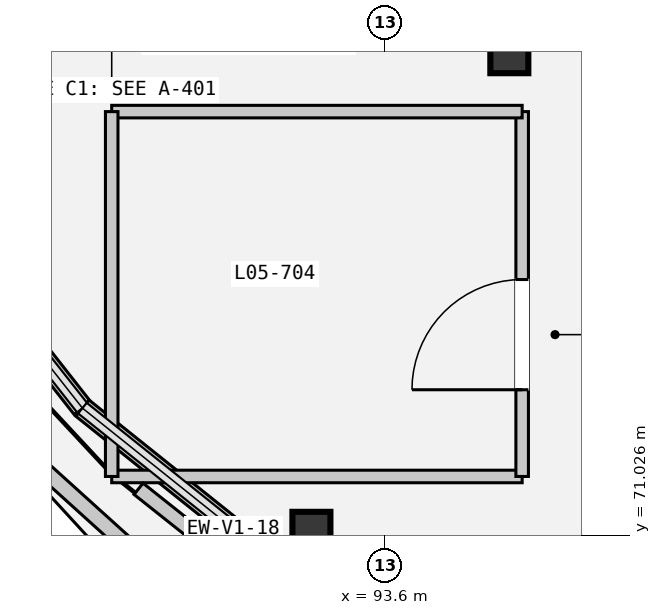
"""IFC4 building model, lengths in metres.
Left out: names, types, materials, properties, quantities, classifications, styles, units other than length and angle.
Written with IfcOpenShell. Run it as: python <this file> out.ifc"""

import sys

from ifc_helpers import new_model, si_unit, direction, frame, frame_2d, origin, origin_2d, place, context, subcontext, project, spatial, rectangle, extrude, element, fill, save


model = new_model("IFC4")
c1 = context("Model", 3, precision=1e-05, world=origin(), true_north=direction((0.0, 1.0)))
c2 = subcontext(c1, "Body", "Model", "MODEL_VIEW")
j1 = project(units=[si_unit("LENGTHUNIT", "METRE"), si_unit("PLANEANGLEUNIT", "RADIAN")], contexts=[c1])
p1 = place(None, origin())
s1 = spatial("IfcSite", under=j1, at=p1, CompositionType="ELEMENT")
p2 = place(p1, origin())
s2 = spatial("IfcBuilding", under=s1, at=p2, CompositionType="ELEMENT")
p3 = place(p2, frame((0.0, 0.0, 24.3)))
s3 = spatial("IfcBuildingStorey", under=s2, at=p3, CompositionType="ELEMENT", Elevation=24.3)
for number, where, z_axis, x_axis in (
    (1, (92.627, 71.085, 0.0), (0.0, 0.0, 1.0), (1.0, 0.0, 0.0)),
    (2, (95.231, 77.355, 0.0), (0.0, 0.0, 1.0), (1.0, 0.0, 0.0)),
):
    element("IfcColumn", number, at=place(p3, frame(where, z_axis=z_axis, x_axis=x_axis)), inside=s3, PredefinedType="COLUMN", context=c2, shape_type="SweptSolid", body=[
        extrude(rectangle(XDim=0.5, YDim=0.5, at=origin_2d()), origin(), (0.0, 0.0, 1.0), 4.5),
    ])
p4 = place(p3, frame((86.631, 76.5, 0.0), z_axis=(0.0, 0.0, 1.0), x_axis=(0.617498011037, -0.786572441906, 0.0)))
e3 = element("IfcWall", 3, at=p4, inside=s3, PredefinedType="SOLIDWALL", context=c2, shape_type="SweptSolid", body=[
    extrude(rectangle(XDim=4.833, YDim=0.275, at=frame_2d((2.417, 0.0))), origin(), (0.0, 0.0, 1.0), 1.02),
])
p5 = place(p3, frame((89.615, 72.699, 0.0), z_axis=(0.0, 0.0, 1.0), x_axis=(0.780742210705, -0.624853263113, 0.0)))
e4 = element("IfcWall", 4, at=p5, inside=s3, PredefinedType="SOLIDWALL", context=c2, shape_type="SweptSolid", body=[
    extrude(rectangle(XDim=5.081, YDim=0.275, at=frame_2d((2.54, 0.0))), origin(), (0.0, 0.0, 1.0), 1.02),
])
p6 = place(p3, frame((88.711, 72.245, 0.0), z_axis=(0.0, 0.0, 1.0), x_axis=(0.741736484104, -0.670691425433, 0.0)))
e5 = element("IfcWall", 5, at=p6, inside=s3, PredefinedType="PARAPET", context=c2, shape_type="SweptSolid", body=[
    extrude(rectangle(XDim=4.869, YDim=0.205, at=frame_2d((2.435, 0.0))), origin(), (0.0, 0.0, 1.0), 0.92),
])
p7 = place(p3, frame((90.0, 71.8, 0.0), z_axis=(0.0, 0.0, 1.0), x_axis=(1.0, 0.0, 0.0)))
e6 = element("IfcWall", 6, at=p7, inside=s3, PredefinedType="PARTITIONING", context=c2, shape_type="SweptSolid", body=[
    extrude(rectangle(XDim=5.4, YDim=0.165, at=frame_2d((2.7, 0.0))), origin(), (0.0, 0.0, 1.0), 3.45),
])
p8 = place(p3, frame((95.4, 71.8, 0.0), z_axis=(0.0, 0.0, 1.0), x_axis=(0.0, 1.0, 0.0)))
e7 = element("IfcWall", 7, at=p8, inside=s3, PredefinedType="PARTITIONING", context=c2, shape_type="SweptSolid", body=[
    extrude(rectangle(XDim=4.8, YDim=0.165, at=frame_2d((2.4, 0.0))), origin(), (0.0, 0.0, 1.0), 3.45),
])
p9 = place(p8, frame((1.141, 0.0, 0.0)))
e8 = element("IfcOpeningElement", 8, at=p9, cuts=e7, PredefinedType="OPENING", context=c2, shape_type="SweptSolid", body=[
    extrude(rectangle(XDim=1.45, YDim=2.2, at=frame_2d((0.725, 1.1))), frame((0.0, 0.093, 0.0), z_axis=(0.0, -1.0, 0.0), x_axis=(1.0, 0.0, 0.0)), (0.0, 0.0, 1.0), 0.185),
])
p10 = place(p3, frame((95.4, 76.6, 0.0), z_axis=(0.0, 0.0, 1.0), x_axis=(-1.0, 0.0, 0.0)))
e9 = element("IfcWall", 9, at=p10, inside=s3, PredefinedType="PARTITIONING", context=c2, shape_type="SweptSolid", body=[
    extrude(rectangle(XDim=5.4, YDim=0.165, at=frame_2d((2.7, 0.0))), origin(), (0.0, 0.0, 1.0), 3.45),
])
p11 = place(p3, frame((90.0, 76.6, 0.0), z_axis=(0.0, 0.0, 1.0), x_axis=(0.0, -1.0, 0.0)))
e10 = element("IfcWall", 10, at=p11, inside=s3, PredefinedType="PARTITIONING", context=c2, shape_type="SweptSolid", body=[
    extrude(rectangle(XDim=4.8, YDim=0.165, at=frame_2d((2.4, 0.0))), origin(), (0.0, 0.0, 1.0), 3.45),
])
p12 = place(p3, frame((92.698, 69.774, 0.0), z_axis=(0.0, 0.0, 1.0), x_axis=(-0.782852775526, 0.622206984734, 0.0)))
e11 = element("IfcWall", 11, at=p12, inside=s3, PredefinedType="PARAPET", context=c2, shape_type="SweptSolid", body=[
    extrude(rectangle(XDim=2.995, YDim=0.19, at=frame_2d((1.498, 0.0))), origin(), (0.0, 0.0, 1.0), 1.12),
])
p13 = place(p9, origin())
e12 = element("IfcDoor", 12, at=p13, inside=s3, OperationType="SINGLE_SWING_RIGHT", PredefinedType="DOOR", context=c2, shape_type="SweptSolid", body=[
    extrude(rectangle(XDim=1.45, YDim=2.2, at=frame_2d((0.725, 1.1))), frame((0.0, 0.025, 0.0), z_axis=(0.0, -1.0, 0.0), x_axis=(1.0, 0.0, 0.0)), (0.0, 0.0, 1.0), 0.05),
])
fill(e8, e12)
save(model, sys.argv[1])
